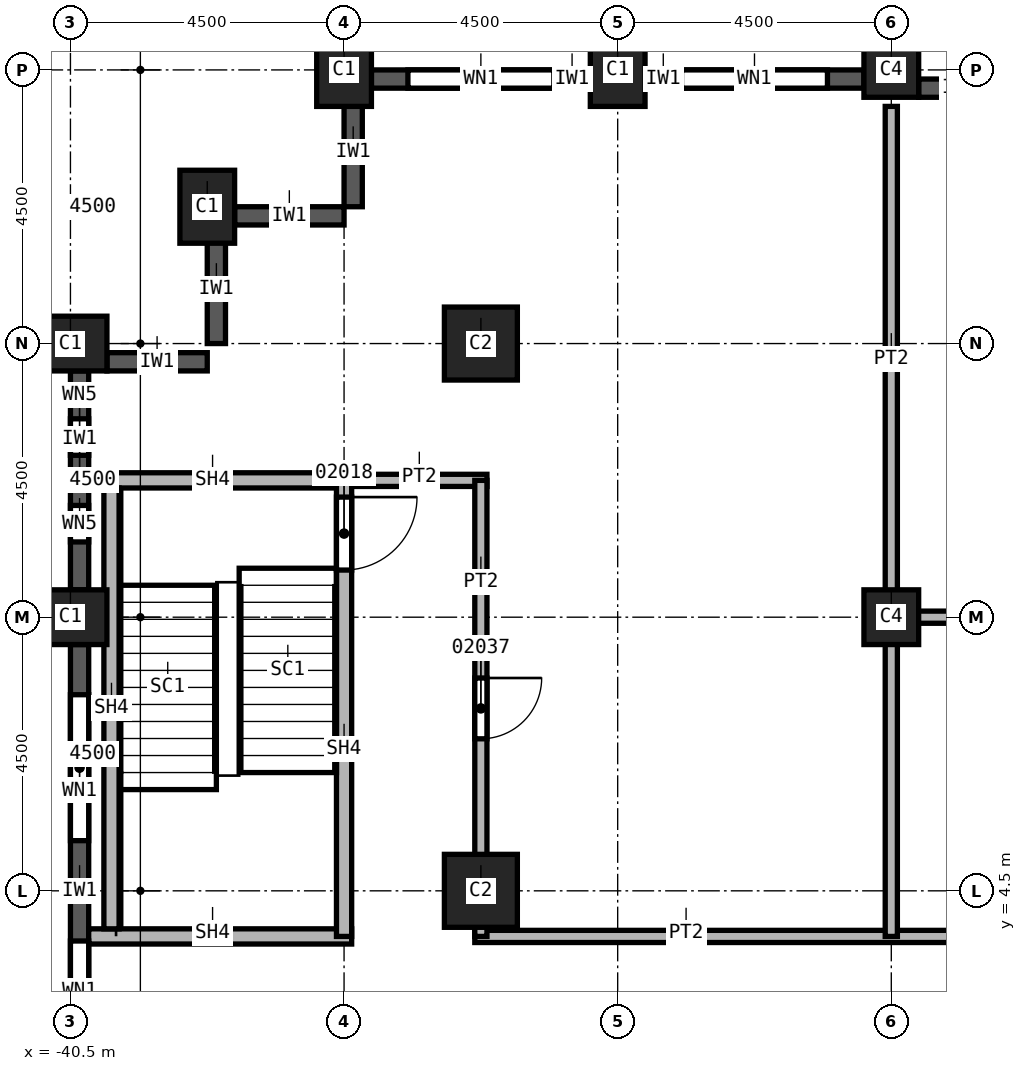
"""IFC4 building model, lengths in metres.
Left out: names, types, materials, properties, quantities, classifications, styles, units other than length and angle.
Written with IfcOpenShell. Run it as: python <this file> out.ifc"""

import sys

from ifc_helpers import new_model, si_unit, direction, frame, frame_2d, origin, origin_2d, place, context, subcontext, project, spatial, rectangle, extrude, element, fill, save


model = new_model("IFC4")
c1 = context("Model", 3, precision=1e-05, world=origin(), true_north=direction((0.0, 1.0)))
c2 = subcontext(c1, "Body", "Model", "MODEL_VIEW")
j1 = project(units=[si_unit("LENGTHUNIT", "METRE"), si_unit("PLANEANGLEUNIT", "RADIAN")], contexts=[c1])
p1 = place(None, origin())
s1 = spatial("IfcSite", under=j1, at=p1, CompositionType="ELEMENT")
p2 = place(p1, origin())
s2 = spatial("IfcBuilding", under=s1, at=p2, CompositionType="ELEMENT")
p3 = place(p2, frame((0.0, 0.0, 80.0)))
s3 = spatial("IfcBuildingStorey", under=s2, at=p3, CompositionType="ELEMENT", Elevation=80.0)
for number, where, z_axis, x_axis in (
    (1, (-40.5, 9.0, 0.0), (0.0, 0.0, 1.0), (0.0, 1.0, 0.0)),
    (2, (-40.5, 13.5, 0.0), (0.0, 0.0, 1.0), (0.0, 1.0, 0.0)),
    (3, (-38.25, 15.75, 0.0), (0.0, 0.0, 1.0), (1.0, 0.0, 0.0)),
    (4, (-31.5, 18.0, 0.0), (0.0, 0.0, 1.0), (1.0, 0.0, 0.0)),
    (5, (-36.0, 18.0, 0.0), (0.0, 0.0, 1.0), (1.0, 0.0, 0.0)),
):
    element("IfcColumn", number, at=place(p3, frame(where, z_axis=z_axis, x_axis=x_axis)), inside=s3, PredefinedType="COLUMN", context=c2, shape_type="SweptSolid", body=[
        extrude(rectangle(XDim=0.9, YDim=1.2, at=origin_2d()), origin(), (0.0, 0.0, 1.0), 3.7),
    ])
for number, where, z_axis, x_axis in (
    (6, (-33.75, 4.5, 0.0), (0.0, 0.0, 1.0), (1.0, 0.0, 0.0)),
    (7, (-33.75, 13.5, 0.0), (0.0, 0.0, 1.0), (1.0, 0.0, 0.0)),
):
    element("IfcColumn", number, at=place(p3, frame(where, z_axis=z_axis, x_axis=x_axis)), inside=s3, PredefinedType="COLUMN", context=c2, shape_type="SweptSolid", body=[
        extrude(rectangle(XDim=1.2, YDim=1.2, at=origin_2d()), origin(), (0.0, 0.0, 1.0), 3.7),
    ])
for number, where, z_axis, x_axis in (
    (8, (-27.0, 9.0, 0.0), (0.0, 0.0, 1.0), (1.0, 0.0, 0.0)),
    (9, (-27.0, 18.0, 0.0), (0.0, 0.0, 1.0), (1.0, 0.0, 0.0)),
):
    element("IfcColumn", number, at=place(p3, frame(where, z_axis=z_axis, x_axis=x_axis)), inside=s3, PredefinedType="COLUMN", context=c2, shape_type="SweptSolid", body=[
        extrude(rectangle(XDim=0.9, YDim=0.9, at=origin_2d()), origin(), (0.0, 0.0, 1.0), 3.7),
    ])
for number, where, z_axis, x_axis in (
    (10, (-35.85, 17.55, 0.0), (0.0, 0.0, 1.0), (0.0, -1.0, 0.0)),
    (11, (-37.8, 15.6, 0.0), (0.0, 0.0, 1.0), (1.0, 0.0, 0.0)),
    (12, (-38.1, 15.3, 0.0), (0.0, 0.0, 1.0), (0.0, -1.0, 0.0)),
):
    element("IfcWall", number, at=place(p3, frame(where, z_axis=z_axis, x_axis=x_axis)), inside=s3, PredefinedType="SOLIDWALL", context=c2, shape_type="SweptSolid", body=[
        extrude(rectangle(XDim=1.8, YDim=0.3, at=frame_2d((0.9, 0.0))), origin(), (0.0, 0.0, 1.0), 3.1),
    ])
p4 = place(p3, frame((-39.9, 13.2, 0.0), z_axis=(0.0, 0.0, 1.0), x_axis=(1.0, 0.0, 0.0)))
e13 = element("IfcWall", 13, at=p4, inside=s3, PredefinedType="SOLIDWALL", context=c2, shape_type="SweptSolid", body=[
    extrude(rectangle(XDim=1.65, YDim=0.3, at=frame_2d((0.825, 0.0))), origin(), (0.0, 0.0, 1.0), 3.1),
])
p5 = place(p3, frame((-25.2, 17.7, 0.0), z_axis=(0.0, 0.0, 1.0), x_axis=(-1.0, 0.0, 0.0)))
e14 = element("IfcWall", 14, at=p5, inside=s3, PredefinedType="SOLIDWALL", context=c2, shape_type="SweptSolid", body=[
    extrude(rectangle(XDim=1.35, YDim=0.3, at=frame_2d((0.675, 0.0))), origin(), (0.0, 0.0, 1.0), 3.1),
])
p6 = place(p3, frame((-27.45, 17.85, 0.0), z_axis=(0.0, 0.0, 1.0), x_axis=(-1.0, 0.0, 0.0)))
e15 = element("IfcWall", 15, at=p6, inside=s3, PredefinedType="SOLIDWALL", context=c2, shape_type="SweptSolid", body=[
    extrude(rectangle(XDim=3.6, YDim=0.3, at=frame_2d((1.8, 0.0))), origin(), (0.0, 0.0, 1.0), 3.1),
])
p7 = place(p6, frame((0.6, 0.0, 0.8)))
e16 = element("IfcOpeningElement", 16, at=p7, cuts=e15, PredefinedType="OPENING", context=c2, shape_type="SweptSolid", body=[
    extrude(rectangle(XDim=2.4, YDim=1.95, at=frame_2d((1.2, 0.975))), frame((0.0, 0.15, 0.0), z_axis=(0.0, -1.0, 0.0), x_axis=(1.0, 0.0, 0.0)), (0.0, 0.0, 1.0), 0.3),
])
p8 = place(p3, frame((-31.95, 17.85, 0.0), z_axis=(0.0, 0.0, 1.0), x_axis=(-1.0, 0.0, 0.0)))
e17 = element("IfcWall", 17, at=p8, inside=s3, PredefinedType="SOLIDWALL", context=c2, shape_type="SweptSolid", body=[
    extrude(rectangle(XDim=3.6, YDim=0.3, at=frame_2d((1.8, 0.0))), origin(), (0.0, 0.0, 1.0), 3.1),
])
p9 = place(p8, frame((0.6, 0.0, 0.8)))
e18 = element("IfcOpeningElement", 18, at=p9, cuts=e17, PredefinedType="OPENING", context=c2, shape_type="SweptSolid", body=[
    extrude(rectangle(XDim=2.4, YDim=1.95, at=frame_2d((1.2, 0.975))), frame((0.0, 0.15, 0.0), z_axis=(0.0, -1.0, 0.0), x_axis=(1.0, 0.0, 0.0)), (0.0, 0.0, 1.0), 0.3),
])
p10 = place(p3, frame((-40.35, 13.05, 0.0), z_axis=(0.0, 0.0, 1.0), x_axis=(0.0, -1.0, 0.0)))
e19 = element("IfcWall", 19, at=p10, inside=s3, PredefinedType="SOLIDWALL", context=c2, shape_type="SweptSolid", body=[
    extrude(rectangle(XDim=3.6, YDim=0.3, at=frame_2d((1.8, 0.0))), origin(), (0.0, 0.0, 1.0), 3.1),
])
p11 = place(p10, frame((0.788, 0.0, 0.8)))
e20 = element("IfcOpeningElement", 20, at=p11, cuts=e19, PredefinedType="OPENING", context=c2, shape_type="SweptSolid", body=[
    extrude(rectangle(XDim=0.6, YDim=1.95, at=frame_2d((0.3, 0.975))), frame((0.0, 0.15, 0.0), z_axis=(0.0, -1.0, 0.0), x_axis=(1.0, 0.0, 0.0)), (0.0, 0.0, 1.0), 0.3),
])
p12 = place(p10, frame((2.212, 0.0, 0.8)))
e21 = element("IfcOpeningElement", 21, at=p12, cuts=e19, PredefinedType="OPENING", context=c2, shape_type="SweptSolid", body=[
    extrude(rectangle(XDim=0.6, YDim=1.95, at=frame_2d((0.3, 0.975))), frame((0.0, 0.15, 0.0), z_axis=(0.0, -1.0, 0.0), x_axis=(1.0, 0.0, 0.0)), (0.0, 0.0, 1.0), 0.3),
])
p13 = place(p3, frame((-40.35, 8.55, 0.0), z_axis=(0.0, 0.0, 1.0), x_axis=(0.0, -1.0, 0.0)))
e22 = element("IfcWall", 22, at=p13, inside=s3, PredefinedType="SOLIDWALL", context=c2, shape_type="SweptSolid", body=[
    extrude(rectangle(XDim=8.1, YDim=0.3, at=frame_2d((4.05, 0.0))), origin(), (0.0, 0.0, 1.0), 3.1),
])
p14 = place(p13, frame((0.825, 0.0, 0.8)))
e23 = element("IfcOpeningElement", 23, at=p14, cuts=e22, PredefinedType="OPENING", context=c2, shape_type="SweptSolid", body=[
    extrude(rectangle(XDim=2.4, YDim=1.95, at=frame_2d((1.2, 0.975))), frame((0.0, 0.15, 0.0), z_axis=(0.0, -1.0, 0.0), x_axis=(1.0, 0.0, 0.0)), (0.0, 0.0, 1.0), 0.3),
])
p15 = place(p13, frame((4.875, 0.0, 0.8)))
e24 = element("IfcOpeningElement", 24, at=p15, cuts=e22, PredefinedType="OPENING", context=c2, shape_type="SweptSolid", body=[
    extrude(rectangle(XDim=2.4, YDim=1.95, at=frame_2d((1.2, 0.975))), frame((0.0, 0.15, 0.0), z_axis=(0.0, -1.0, 0.0), x_axis=(1.0, 0.0, 0.0)), (0.0, 0.0, 1.0), 0.3),
])
p16 = place(p3, frame((-36.0, 11.25, 0.0), z_axis=(0.0, 0.0, 1.0), x_axis=(1.0, 0.0, 0.0)))
e25 = element("IfcWall", 25, at=p16, inside=s3, PredefinedType="PARTITIONING", context=c2, shape_type="SweptSolid", body=[
    extrude(rectangle(XDim=2.35, YDim=0.2, at=frame_2d((1.175, 0.0))), origin(), (0.0, 0.0, 1.0), 3.7),
])
p17 = place(p3, frame((-33.85, 3.75, 0.0), z_axis=(0.0, 0.0, 1.0), x_axis=(1.0, 0.0, 0.0)))
e26 = element("IfcWall", 26, at=p17, inside=s3, PredefinedType="PARTITIONING", context=c2, shape_type="SweptSolid", body=[
    extrude(rectangle(XDim=18.45, YDim=0.2, at=frame_2d((9.225, 0.0))), origin(), (0.0, 0.0, 1.0), 3.7),
])
p18 = place(p17, frame((9.4, 0.0, 0.0)))
e27 = element("IfcOpeningElement", 27, at=p18, cuts=e26, PredefinedType="OPENING", context=c2, shape_type="SweptSolid", body=[
    extrude(rectangle(XDim=1.0, YDim=2.1, at=frame_2d((0.5, 1.05))), frame((0.0, 0.1, 0.0), z_axis=(0.0, -1.0, 0.0), x_axis=(1.0, 0.0, 0.0)), (0.0, 0.0, 1.0), 0.2),
])
p19 = place(p3, frame((-33.75, 11.25, 0.0), z_axis=(0.0, 0.0, 1.0), x_axis=(0.0, -1.0, 0.0)))
e28 = element("IfcWall", 28, at=p19, inside=s3, PredefinedType="PARTITIONING", context=c2, shape_type="SweptSolid", body=[
    extrude(rectangle(XDim=7.5, YDim=0.2, at=frame_2d((3.75, 0.0))), origin(), (0.0, 0.0, 1.0), 3.7),
])
p20 = place(p19, frame((3.25, 0.0, 0.0)))
e29 = element("IfcOpeningElement", 29, at=p20, cuts=e28, PredefinedType="OPENING", context=c2, shape_type="SweptSolid", body=[
    extrude(rectangle(XDim=1.0, YDim=2.1, at=frame_2d((0.5, 1.05))), frame((0.0, 0.1, 0.0), z_axis=(0.0, -1.0, 0.0), x_axis=(1.0, 0.0, 0.0)), (0.0, 0.0, 1.0), 0.2),
])
p21 = place(p3, frame((-27.1, 9.0, 0.0), z_axis=(0.0, 0.0, 1.0), x_axis=(1.0, 0.0, 0.0)))
e30 = element("IfcWall", 30, at=p21, inside=s3, PredefinedType="PARTITIONING", context=c2, shape_type="SweptSolid", body=[
    extrude(rectangle(XDim=11.7, YDim=0.2, at=frame_2d((5.85, 0.0))), origin(), (0.0, 0.0, 1.0), 3.7),
])
p22 = place(p3, frame((-27.0, 3.75, 0.0), z_axis=(0.0, 0.0, 1.0), x_axis=(0.0, 1.0, 0.0)))
e31 = element("IfcWall", 31, at=p22, inside=s3, PredefinedType="PARTITIONING", context=c2, shape_type="SweptSolid", body=[
    extrude(rectangle(XDim=13.65, YDim=0.2, at=frame_2d((6.825, 0.0))), origin(), (0.0, 0.0, 1.0), 3.7),
])
p23 = place(p3, frame((-40.2, 3.75, 0.0), z_axis=(0.0, 0.0, 1.0), x_axis=(1.0, 0.0, 0.0)))
e32 = element("IfcWall", 32, at=p23, inside=s3, PredefinedType="SOLIDWALL", context=c2, shape_type="SweptSolid", body=[
    extrude(rectangle(XDim=4.325, YDim=0.25, at=frame_2d((2.163, 0.0))), origin(), (0.0, 0.0, 1.0), 3.7),
])
p24 = place(p3, frame((-40.2, 11.25, 0.0), z_axis=(0.0, 0.0, 1.0), x_axis=(1.0, 0.0, 0.0)))
e33 = element("IfcWall", 33, at=p24, inside=s3, PredefinedType="SOLIDWALL", context=c2, shape_type="SweptSolid", body=[
    extrude(rectangle(XDim=4.2, YDim=0.25, at=frame_2d((2.1, 0.0))), origin(), (0.0, 0.0, 1.0), 3.7),
])
p25 = place(p3, frame((-36.0, 11.375, 0.0), z_axis=(0.0, 0.0, 1.0), x_axis=(0.0, -1.0, 0.0)))
e34 = element("IfcWall", 34, at=p25, inside=s3, PredefinedType="SOLIDWALL", context=c2, shape_type="SweptSolid", body=[
    extrude(rectangle(XDim=7.625, YDim=0.25, at=frame_2d((3.812, 0.0))), origin(), (0.0, 0.0, 1.0), 3.7),
])
p26 = place(p25, frame((0.4, 0.0, 0.0)))
e35 = element("IfcOpeningElement", 35, at=p26, cuts=e34, PredefinedType="OPENING", context=c2, shape_type="SweptSolid", body=[
    extrude(rectangle(XDim=1.2, YDim=2.1, at=frame_2d((0.6, 1.05))), frame((0.0, 0.125, 0.0), z_axis=(0.0, -1.0, 0.0), x_axis=(1.0, 0.0, 0.0)), (0.0, 0.0, 1.0), 0.25),
])
p27 = place(p3, frame((-39.825, 3.875, 0.0), z_axis=(0.0, 0.0, 1.0), x_axis=(0.0, 1.0, 0.0)))
e36 = element("IfcWall", 36, at=p27, inside=s3, PredefinedType="SOLIDWALL", context=c2, shape_type="SweptSolid", body=[
    extrude(rectangle(XDim=7.25, YDim=0.25, at=frame_2d((3.625, 0.0))), origin(), (0.0, 0.0, 1.0), 3.7),
])
p28 = place(p7, origin())
e37 = element("IfcWindow", 37, at=p28, inside=s3, PartitioningType="SINGLE_PANEL", PredefinedType="WINDOW", context=c2, shape_type="SweptSolid", body=[
    extrude(rectangle(XDim=2.4, YDim=1.95, at=frame_2d((1.2, 0.975))), frame((0.0, 0.03, 0.0), z_axis=(0.0, -1.0, 0.0), x_axis=(1.0, 0.0, 0.0)), (0.0, 0.0, 1.0), 0.06),
])
fill(e16, e37)
p29 = place(p9, origin())
e38 = element("IfcWindow", 38, at=p29, inside=s3, PartitioningType="SINGLE_PANEL", PredefinedType="WINDOW", context=c2, shape_type="SweptSolid", body=[
    extrude(rectangle(XDim=2.4, YDim=1.95, at=frame_2d((1.2, 0.975))), frame((0.0, 0.03, 0.0), z_axis=(0.0, -1.0, 0.0), x_axis=(1.0, 0.0, 0.0)), (0.0, 0.0, 1.0), 0.06),
])
fill(e18, e38)
p30 = place(p14, origin())
e39 = element("IfcWindow", 39, at=p30, inside=s3, PartitioningType="SINGLE_PANEL", PredefinedType="WINDOW", context=c2, shape_type="SweptSolid", body=[
    extrude(rectangle(XDim=2.4, YDim=1.95, at=frame_2d((1.2, 0.975))), frame((0.0, 0.03, 0.0), z_axis=(0.0, -1.0, 0.0), x_axis=(1.0, 0.0, 0.0)), (0.0, 0.0, 1.0), 0.06),
])
fill(e23, e39)
p31 = place(p15, origin())
e40 = element("IfcWindow", 40, at=p31, inside=s3, PartitioningType="SINGLE_PANEL", PredefinedType="WINDOW", context=c2, shape_type="SweptSolid", body=[
    extrude(rectangle(XDim=2.4, YDim=1.95, at=frame_2d((1.2, 0.975))), frame((0.0, 0.03, 0.0), z_axis=(0.0, -1.0, 0.0), x_axis=(1.0, 0.0, 0.0)), (0.0, 0.0, 1.0), 0.06),
])
fill(e24, e40)
p32 = place(p26, origin())
e41 = element("IfcDoor", 41, at=p32, inside=s3, OperationType="SINGLE_SWING_LEFT", PredefinedType="DOOR", context=c2, shape_type="SweptSolid", body=[
    extrude(rectangle(XDim=1.2, YDim=2.1, at=frame_2d((0.6, 1.05))), frame((0.0, 0.025, 0.0), z_axis=(0.0, -1.0, 0.0), x_axis=(1.0, 0.0, 0.0)), (0.0, 0.0, 1.0), 0.05),
])
fill(e35, e41)
p33 = place(p20, origin())
e42 = element("IfcDoor", 42, at=p33, inside=s3, OperationType="SINGLE_SWING_RIGHT", PredefinedType="DOOR", context=c2, shape_type="SweptSolid", body=[
    extrude(rectangle(XDim=1.0, YDim=2.1, at=frame_2d((0.5, 1.05))), frame((0.0, 0.025, 0.0), z_axis=(0.0, -1.0, 0.0), x_axis=(1.0, 0.0, 0.0)), (0.0, 0.0, 1.0), 0.05),
])
fill(e29, e42)
p34 = place(p11, origin())
e43 = element("IfcWindow", 43, at=p34, inside=s3, PartitioningType="SINGLE_PANEL", PredefinedType="WINDOW", context=c2, shape_type="SweptSolid", body=[
    extrude(rectangle(XDim=0.6, YDim=1.95, at=frame_2d((0.3, 0.975))), frame((0.0, 0.03, 0.0), z_axis=(0.0, -1.0, 0.0), x_axis=(1.0, 0.0, 0.0)), (0.0, 0.0, 1.0), 0.06),
])
fill(e20, e43)
p35 = place(p12, origin())
e44 = element("IfcWindow", 44, at=p35, inside=s3, PartitioningType="SINGLE_PANEL", PredefinedType="WINDOW", context=c2, shape_type="SweptSolid", body=[
    extrude(rectangle(XDim=0.6, YDim=1.95, at=frame_2d((0.3, 0.975))), frame((0.0, 0.03, 0.0), z_axis=(0.0, -1.0, 0.0), x_axis=(1.0, 0.0, 0.0)), (0.0, 0.0, 1.0), 0.06),
])
fill(e21, e44)
save(model, sys.argv[1])
